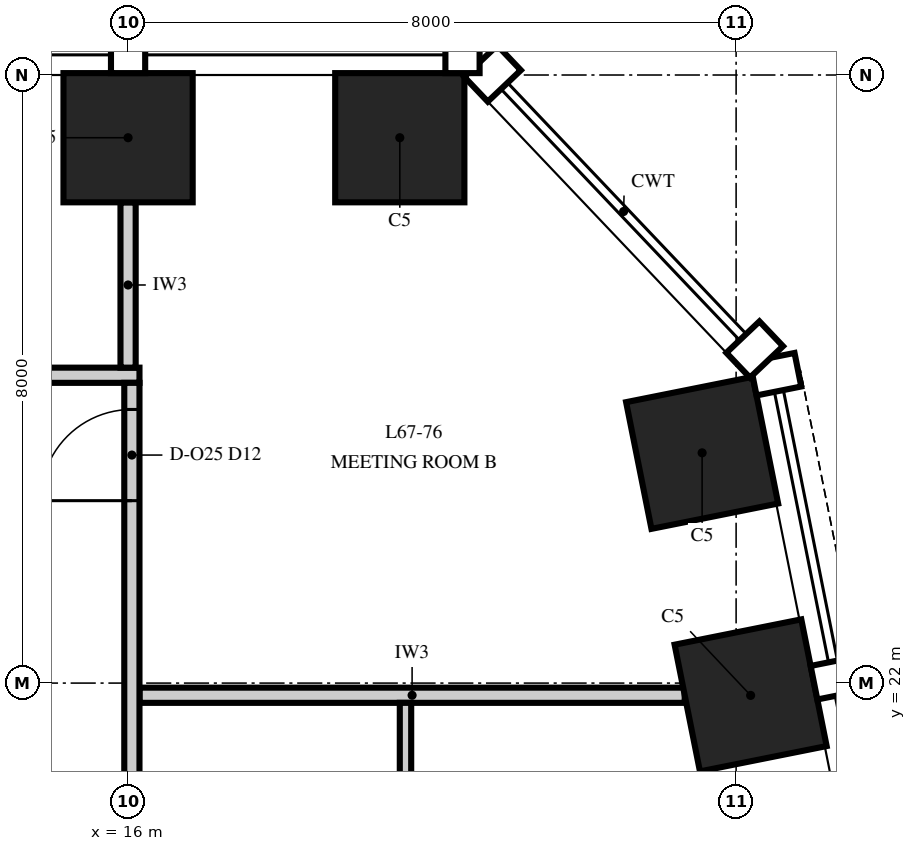
"""IFC4 building model, lengths in metres.
Left out: names, types, materials, properties, quantities, classifications, styles, units other than length and angle.
Written with IfcOpenShell. Run it as: python <this file> out.ifc"""

import sys

from ifc_helpers import new_model, si_unit, direction, frame, frame_2d, origin, origin_2d, place, context, subcontext, project, spatial, rectangle, extrude, element, fill, save


model = new_model("IFC4")
c1 = context("Model", 3, precision=1e-05, world=origin(), true_north=direction((0.0, 1.0)))
c2 = subcontext(c1, "Body", "Model", "MODEL_VIEW")
j1 = project(units=[si_unit("LENGTHUNIT", "METRE"), si_unit("PLANEANGLEUNIT", "RADIAN")], contexts=[c1])
p1 = place(None, origin())
s1 = spatial("IfcSite", under=j1, at=p1, CompositionType="ELEMENT")
p2 = place(p1, origin())
s2 = spatial("IfcBuilding", under=s1, at=p2, CompositionType="ELEMENT")
p3 = place(p2, frame((0.0, 0.0, 288.0)))
s3 = spatial("IfcBuildingStorey", under=s2, at=p3, CompositionType="ELEMENT", Elevation=288.0)
for number, where, z_axis, x_axis in (
    (1, (24.191, 21.838, 0.0), (0.0, 0.0, 1.0), (-0.196, 0.981, 0.0)),
    (2, (23.553, 25.029, 0.0), (0.0, 0.0, 1.0), (-0.196, 0.981, 0.0)),
    (3, (19.575, 29.175, 0.0), (0.0, 0.0, 1.0), (-1.0, 0.0, 0.0)),
    (4, (16.0, 29.175, 0.0), (0.0, 0.0, 1.0), (-1.0, 0.0, 0.0)),
):
    element("IfcColumn", number, at=place(p3, frame(where, z_axis=z_axis, x_axis=x_axis)), inside=s3, PredefinedType="COLUMN", context=c2, shape_type="SweptSolid", body=[
        extrude(rectangle(XDim=1.7, YDim=1.7, at=origin_2d()), origin(), (0.0, 0.0, 1.0), 4.0),
    ])
p4 = place(p3, frame((16.15, 21.84, 0.0), z_axis=(0.0, 0.0, 1.0), x_axis=(1.0, 0.0, 0.0)))
e5 = element("IfcWall", 5, at=p4, inside=s3, PredefinedType="PARTITIONING", context=c2, shape_type="SweptSolid", body=[
    extrude(rectangle(XDim=7.174, YDim=0.2, at=frame_2d((3.587, 0.0))), origin(), (0.0, 0.0, 1.0), 3.23),
])
p5 = place(p3, frame((-16.15, 26.05, 0.0), z_axis=(0.0, 0.0, 1.0), x_axis=(1.0, 0.0, 0.0)))
e6 = element("IfcWall", 6, at=p5, inside=s3, PredefinedType="PARTITIONING", context=c2, shape_type="SweptSolid", body=[
    extrude(rectangle(XDim=32.3, YDim=0.2, at=frame_2d((16.15, 0.0))), origin(), (0.0, 0.0, 1.0), 3.418),
])
p6 = place(p5, frame((1.55, 0.0, 0.0)))
e7 = element("IfcOpeningElement", 7, at=p6, cuts=e6, PredefinedType="OPENING", context=c2, shape_type="SweptSolid", body=[
    extrude(rectangle(XDim=1.2, YDim=2.4, at=frame_2d((0.6, 1.2))), frame((0.0, 0.115, 0.0), z_axis=(0.0, -1.0, 0.0), x_axis=(1.0, 0.0, 0.0)), (0.0, 0.0, 1.0), 0.23),
])
p7 = place(p5, frame((5.55, 0.0, 0.0)))
e8 = element("IfcOpeningElement", 8, at=p7, cuts=e6, PredefinedType="OPENING", context=c2, shape_type="SweptSolid", body=[
    extrude(rectangle(XDim=1.2, YDim=2.4, at=frame_2d((0.6, 1.2))), frame((0.0, 0.115, 0.0), z_axis=(0.0, -1.0, 0.0), x_axis=(1.0, 0.0, 0.0)), (0.0, 0.0, 1.0), 0.23),
])
p8 = place(p5, frame((11.55, 0.0, 0.0)))
e9 = element("IfcOpeningElement", 9, at=p8, cuts=e6, PredefinedType="OPENING", context=c2, shape_type="SweptSolid", body=[
    extrude(rectangle(XDim=1.2, YDim=2.4, at=frame_2d((0.6, 1.2))), frame((0.0, 0.115, 0.0), z_axis=(0.0, -1.0, 0.0), x_axis=(1.0, 0.0, 0.0)), (0.0, 0.0, 1.0), 0.23),
])
p9 = place(p5, frame((19.55, 0.0, 0.0)))
e10 = element("IfcOpeningElement", 10, at=p9, cuts=e6, PredefinedType="OPENING", context=c2, shape_type="SweptSolid", body=[
    extrude(rectangle(XDim=1.2, YDim=2.4, at=frame_2d((0.6, 1.2))), frame((0.0, 0.115, 0.0), z_axis=(0.0, -1.0, 0.0), x_axis=(1.0, 0.0, 0.0)), (0.0, 0.0, 1.0), 0.23),
])
p10 = place(p5, frame((25.55, 0.0, 0.0)))
e11 = element("IfcOpeningElement", 11, at=p10, cuts=e6, PredefinedType="OPENING", context=c2, shape_type="SweptSolid", body=[
    extrude(rectangle(XDim=1.2, YDim=2.4, at=frame_2d((0.6, 1.2))), frame((0.0, 0.115, 0.0), z_axis=(0.0, -1.0, 0.0), x_axis=(1.0, 0.0, 0.0)), (0.0, 0.0, 1.0), 0.23),
])
p11 = place(p5, frame((29.55, 0.0, 0.0)))
e12 = element("IfcOpeningElement", 12, at=p11, cuts=e6, PredefinedType="OPENING", context=c2, shape_type="SweptSolid", body=[
    extrude(rectangle(XDim=1.2, YDim=2.4, at=frame_2d((0.6, 1.2))), frame((0.0, 0.115, 0.0), z_axis=(0.0, -1.0, 0.0), x_axis=(1.0, 0.0, 0.0)), (0.0, 0.0, 1.0), 0.23),
])
p12 = place(p3, frame((16.0, 26.15, 0.0), z_axis=(0.0, 0.0, 1.0), x_axis=(0.0, 1.0, 0.0)))
e13 = element("IfcWall", 13, at=p12, inside=s3, PredefinedType="PARTITIONING", context=c2, shape_type="SweptSolid", body=[
    extrude(rectangle(XDim=2.175, YDim=0.2, at=frame_2d((1.087, 0.0))), origin(), (0.0, 0.0, 1.0), 3.418),
])
p13 = place(p3, frame((16.05, 4.05, 0.0), z_axis=(0.0, 0.0, 1.0), x_axis=(0.0, 1.0, 0.0)))
e14 = element("IfcWall", 14, at=p13, inside=s3, PredefinedType="PARTITIONING", context=c2, shape_type="SweptSolid", body=[
    extrude(rectangle(XDim=21.9, YDim=0.2, at=frame_2d((10.95, 0.0))), origin(), (0.0, 0.0, 1.0), 2.842),
])
p14 = place(p13, frame((20.35, 0.0, 0.0)))
e15 = element("IfcOpeningElement", 15, at=p14, cuts=e14, PredefinedType="OPENING", context=c2, shape_type="SweptSolid", body=[
    extrude(rectangle(XDim=1.2, YDim=2.4, at=frame_2d((0.6, 1.2))), frame((0.0, 0.115, 0.0), z_axis=(0.0, -1.0, 0.0), x_axis=(1.0, 0.0, 0.0)), (0.0, 0.0, 1.0), 0.23),
])
p15 = place(p13, frame((10.35, 0.0, 0.0)))
e16 = element("IfcOpeningElement", 16, at=p15, cuts=e14, PredefinedType="OPENING", context=c2, shape_type="SweptSolid", body=[
    extrude(rectangle(XDim=1.2, YDim=2.4, at=frame_2d((0.6, 1.2))), frame((0.0, 0.115, 0.0), z_axis=(0.0, -1.0, 0.0), x_axis=(1.0, 0.0, 0.0)), (0.0, 0.0, 1.0), 0.23),
])
p16 = place(p3, frame((19.65, 17.915, 0.0), z_axis=(0.0, 0.0, 1.0), x_axis=(0.0, 1.0, 0.0)))
e17 = element("IfcWall", 17, at=p16, inside=s3, PredefinedType="PARTITIONING", context=c2, shape_type="SweptSolid", body=[
    extrude(rectangle(XDim=3.825, YDim=0.15, at=frame_2d((1.913, 0.0))), origin(), (0.0, 0.0, 1.0), 3.23),
])
p17 = place(p16, frame((1.425, 0.0, 0.0)))
e18 = element("IfcOpeningElement", 18, at=p17, cuts=e17, PredefinedType="OPENING", context=c2, shape_type="SweptSolid", body=[
    extrude(rectangle(XDim=1.0, YDim=2.3, at=frame_2d((0.5, 1.15))), frame((0.0, 0.09, 0.0), z_axis=(0.0, -1.0, 0.0), x_axis=(1.0, 0.0, 0.0)), (0.0, 0.0, 1.0), 0.18),
])
p18 = place(p14, origin())
e19 = element("IfcDoor", 19, at=p18, inside=s3, OperationType="SINGLE_SWING_LEFT", PredefinedType="DOOR", context=c2, shape_type="SweptSolid", body=[
    extrude(rectangle(XDim=1.2, YDim=2.4, at=frame_2d((0.6, 1.2))), frame((0.0, 0.1, 0.0), z_axis=(0.0, -1.0, 0.0), x_axis=(1.0, 0.0, 0.0)), (0.0, 0.0, 1.0), 0.199),
])
fill(e15, e19)
save(model, sys.argv[1])
